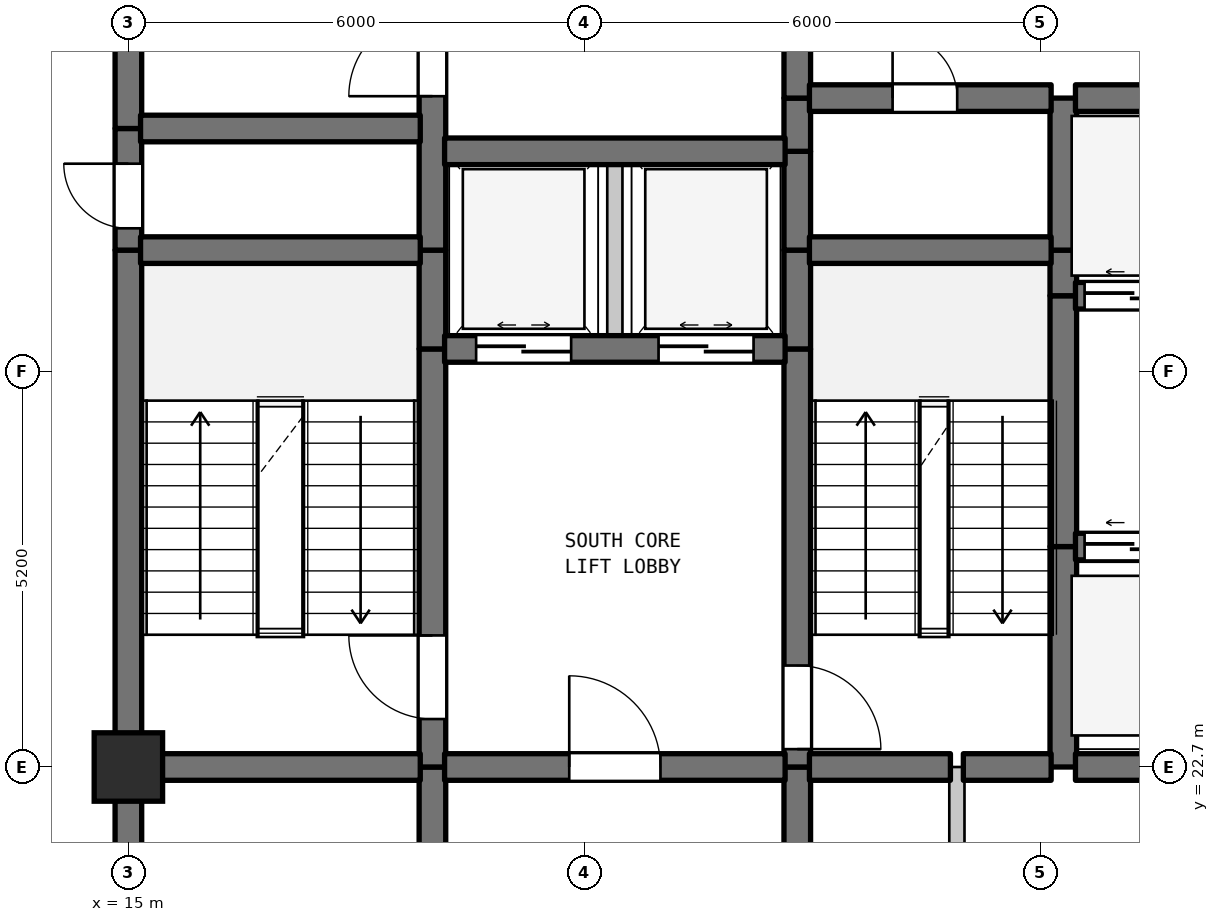
"""IFC4 building model, lengths in metres.
Left out: names, types, materials, properties, quantities, classifications, styles, units other than length and angle.
Written with IfcOpenShell. Run it as: python <this file> out.ifc"""

import sys

from ifc_helpers import new_model, si_unit, direction, frame, frame_2d, origin, origin_2d, place, context, subcontext, project, spatial, rectangle, extrude, element, fill, save


model = new_model("IFC4")
c1 = context("Model", 3, precision=1e-05, world=origin(), true_north=direction((0.0, 1.0)))
c2 = subcontext(c1, "Body", "Model", "MODEL_VIEW")
j1 = project(units=[si_unit("LENGTHUNIT", "METRE"), si_unit("PLANEANGLEUNIT", "RADIAN")], contexts=[c1])
p1 = place(None, origin())
s1 = spatial("IfcSite", under=j1, at=p1, CompositionType="ELEMENT")
p2 = place(p1, origin())
s2 = spatial("IfcBuilding", under=s1, at=p2, CompositionType="ELEMENT")
p3 = place(p2, frame((0.0, 0.0, 164.6)))
s3 = spatial("IfcBuildingStorey", under=s2, at=p3, CompositionType="ELEMENT", Elevation=164.6)
p4 = place(p3, frame((15.0, 22.7, 0.0), z_axis=(0.0, 0.0, 1.0), x_axis=(1.0, 0.0, 0.0)))
e1 = element("IfcColumn", 1, at=p4, inside=s3, PredefinedType="COLUMN", context=c2, shape_type="SweptSolid", body=[
    extrude(rectangle(XDim=0.9, YDim=0.9, at=origin_2d()), origin(), (0.0, 0.0, 1.0), 4.5),
])
p5 = place(p3, frame((15.0, 19.5, 0.0), z_axis=(0.0, 0.0, 1.0), x_axis=(0.0, 1.0, 0.0)))
e2 = element("IfcWall", 2, at=p5, inside=s3, PredefinedType="SHEAR", context=c2, shape_type="SweptSolid", body=[
    extrude(rectangle(XDim=3.2, YDim=0.35, at=frame_2d((1.6, 0.0))), origin(), (0.0, 0.0, 1.0), 4.19),
])
p6 = place(p3, frame((15.0, 22.7, 0.0), z_axis=(0.0, 0.0, 1.0), x_axis=(0.0, 1.0, 0.0)))
e3 = element("IfcWall", 3, at=p6, inside=s3, PredefinedType="SHEAR", context=c2, shape_type="SweptSolid", body=[
    extrude(rectangle(XDim=6.8, YDim=0.35, at=frame_2d((3.4, 0.0))), origin(), (0.0, 0.0, 1.0), 4.19),
])
p7 = place(p3, frame((15.0, 29.5, 0.0), z_axis=(0.0, 0.0, 1.0), x_axis=(0.0, 1.0, 0.0)))
e4 = element("IfcWall", 4, at=p7, inside=s3, PredefinedType="SHEAR", context=c2, shape_type="SweptSolid", body=[
    extrude(rectangle(XDim=1.6, YDim=0.35, at=frame_2d((0.8, 0.0))), origin(), (0.0, 0.0, 1.0), 4.19),
])
p8 = place(p7, frame((0.287, 0.0, 0.0)))
e5 = element("IfcOpeningElement", 5, at=p8, cuts=e4, PredefinedType="OPENING", context=c2, shape_type="SweptSolid", body=[
    extrude(rectangle(XDim=0.85, YDim=2.1, at=frame_2d((0.425, 1.05))), frame((0.0, 0.185, 0.0), z_axis=(0.0, -1.0, 0.0), x_axis=(1.0, 0.0, 0.0)), (0.0, 0.0, 1.0), 0.37),
])
p9 = place(p3, frame((15.0, 31.1, 0.0), z_axis=(0.0, 0.0, 1.0), x_axis=(0.0, 1.0, 0.0)))
e6 = element("IfcWall", 6, at=p9, inside=s3, PredefinedType="SHEAR", context=c2, shape_type="SweptSolid", body=[
    extrude(rectangle(XDim=6.8, YDim=0.35, at=frame_2d((3.4, 0.0))), origin(), (0.0, 0.0, 1.0), 4.19),
])
p10 = place(p3, frame((19.0, 19.5, 0.0), z_axis=(0.0, 0.0, 1.0), x_axis=(0.0, 1.0, 0.0)))
e7 = element("IfcWall", 7, at=p10, inside=s3, PredefinedType="SHEAR", context=c2, shape_type="SweptSolid", body=[
    extrude(rectangle(XDim=3.2, YDim=0.35, at=frame_2d((1.6, 0.0))), origin(), (0.0, 0.0, 1.0), 4.19),
])
p11 = place(p3, frame((19.0, 22.7, 0.0), z_axis=(0.0, 0.0, 1.0), x_axis=(0.0, 1.0, 0.0)))
e8 = element("IfcWall", 8, at=p11, inside=s3, PredefinedType="SHEAR", context=c2, shape_type="SweptSolid", body=[
    extrude(rectangle(XDim=5.5, YDim=0.35, at=frame_2d((2.75, 0.0))), origin(), (0.0, 0.0, 1.0), 4.19),
])
p12 = place(p11, frame((0.631, 0.0, 0.0)))
e9 = element("IfcOpeningElement", 9, at=p12, cuts=e8, PredefinedType="OPENING", context=c2, shape_type="SweptSolid", body=[
    extrude(rectangle(XDim=1.1, YDim=2.15, at=frame_2d((0.55, 1.075))), frame((0.0, 0.185, 0.0), z_axis=(0.0, -1.0, 0.0), x_axis=(1.0, 0.0, 0.0)), (0.0, 0.0, 1.0), 0.37),
])
p13 = place(p3, frame((19.0, 28.2, 0.0), z_axis=(0.0, 0.0, 1.0), x_axis=(0.0, 1.0, 0.0)))
e10 = element("IfcWall", 10, at=p13, inside=s3, PredefinedType="SHEAR", context=c2, shape_type="SweptSolid", body=[
    extrude(rectangle(XDim=1.3, YDim=0.35, at=frame_2d((0.65, 0.0))), origin(), (0.0, 0.0, 1.0), 4.19),
])
p14 = place(p3, frame((19.0, 29.5, 0.0), z_axis=(0.0, 0.0, 1.0), x_axis=(0.0, 1.0, 0.0)))
e11 = element("IfcWall", 11, at=p14, inside=s3, PredefinedType="SHEAR", context=c2, shape_type="SweptSolid", body=[
    extrude(rectangle(XDim=5.5, YDim=0.35, at=frame_2d((2.75, 0.0))), origin(), (0.0, 0.0, 1.0), 4.19),
])
p15 = place(p14, frame((2.025, 0.0, 0.0)))
e12 = element("IfcOpeningElement", 12, at=p15, cuts=e11, PredefinedType="OPENING", context=c2, shape_type="SweptSolid", body=[
    extrude(rectangle(XDim=1.1, YDim=2.15, at=frame_2d((0.55, 1.075))), frame((0.0, 0.185, 0.0), z_axis=(0.0, -1.0, 0.0), x_axis=(1.0, 0.0, 0.0)), (0.0, 0.0, 1.0), 0.37),
])
p16 = place(p3, frame((21.4, 28.2, 0.0), z_axis=(0.0, 0.0, 1.0), x_axis=(0.0, 1.0, 0.0)))
e13 = element("IfcWall", 13, at=p16, inside=s3, PredefinedType="STANDARD", context=c2, shape_type="SweptSolid", body=[
    extrude(rectangle(XDim=2.6, YDim=0.2, at=frame_2d((1.3, 0.0))), origin(), (0.0, 0.0, 1.0), 4.19),
])
p17 = place(p3, frame((23.8, 19.5, 0.0), z_axis=(0.0, 0.0, 1.0), x_axis=(0.0, 1.0, 0.0)))
e14 = element("IfcWall", 14, at=p17, inside=s3, PredefinedType="SHEAR", context=c2, shape_type="SweptSolid", body=[
    extrude(rectangle(XDim=3.2, YDim=0.35, at=frame_2d((1.6, 0.0))), origin(), (0.0, 0.0, 1.0), 4.19),
])
p18 = place(p3, frame((23.8, 22.7, 0.0), z_axis=(0.0, 0.0, 1.0), x_axis=(0.0, 1.0, 0.0)))
e15 = element("IfcWall", 15, at=p18, inside=s3, PredefinedType="SHEAR", context=c2, shape_type="SweptSolid", body=[
    extrude(rectangle(XDim=5.5, YDim=0.35, at=frame_2d((2.75, 0.0))), origin(), (0.0, 0.0, 1.0), 4.19),
])
p19 = place(p18, frame((0.235, 0.0, 0.0)))
e16 = element("IfcOpeningElement", 16, at=p19, cuts=e15, PredefinedType="OPENING", context=c2, shape_type="SweptSolid", body=[
    extrude(rectangle(XDim=1.1, YDim=2.15, at=frame_2d((0.55, 1.075))), frame((0.0, 0.185, 0.0), z_axis=(0.0, -1.0, 0.0), x_axis=(1.0, 0.0, 0.0)), (0.0, 0.0, 1.0), 0.37),
])
for number, where, z_axis, x_axis in (
    (17, (23.8, 28.2, 0.0), (0.0, 0.0, 1.0), (0.0, 1.0, 0.0)),
    (18, (23.8, 29.5, 0.0), (0.0, 0.0, 1.0), (0.0, 1.0, 0.0)),
):
    element("IfcWall", number, at=place(p3, frame(where, z_axis=z_axis, x_axis=x_axis)), inside=s3, PredefinedType="SHEAR", context=c2, shape_type="SweptSolid", body=[
        extrude(rectangle(XDim=1.3, YDim=0.35, at=frame_2d((0.65, 0.0))), origin(), (0.0, 0.0, 1.0), 4.19),
    ])
p20 = place(p3, frame((23.8, 30.8, 0.0), z_axis=(0.0, 0.0, 1.0), x_axis=(0.0, 1.0, 0.0)))
e19 = element("IfcWall", 19, at=p20, inside=s3, PredefinedType="SHEAR", context=c2, shape_type="SweptSolid", body=[
    extrude(rectangle(XDim=0.7, YDim=0.35, at=frame_2d((0.35, 0.0))), origin(), (0.0, 0.0, 1.0), 4.19),
])
p21 = place(p3, frame((23.8, 31.5, 0.0), z_axis=(0.0, 0.0, 1.0), x_axis=(0.0, 1.0, 0.0)))
e20 = element("IfcWall", 20, at=p21, inside=s3, PredefinedType="SHEAR", context=c2, shape_type="SweptSolid", body=[
    extrude(rectangle(XDim=3.5, YDim=0.35, at=frame_2d((1.75, 0.0))), origin(), (0.0, 0.0, 1.0), 4.19),
])
p22 = place(p21, frame((1.127, 0.0, 0.0)))
e21 = element("IfcOpeningElement", 21, at=p22, cuts=e20, PredefinedType="OPENING", context=c2, shape_type="SweptSolid", body=[
    extrude(rectangle(XDim=1.1, YDim=2.15, at=frame_2d((0.55, 1.075))), frame((0.0, 0.185, 0.0), z_axis=(0.0, -1.0, 0.0), x_axis=(1.0, 0.0, 0.0)), (0.0, 0.0, 1.0), 0.37),
])
p23 = place(p3, frame((25.9, 19.5, 0.0), z_axis=(0.0, 0.0, 1.0), x_axis=(0.0, 1.0, 0.0)))
e22 = element("IfcWall", 22, at=p23, inside=s3, PredefinedType="STANDARD", context=c2, shape_type="SweptSolid", body=[
    extrude(rectangle(XDim=3.2, YDim=0.2, at=frame_2d((1.6, 0.0))), origin(), (0.0, 0.0, 1.0), 4.19),
])
p24 = place(p3, frame((27.3, 22.7, 0.0), z_axis=(0.0, 0.0, 1.0), x_axis=(0.0, 1.0, 0.0)))
e23 = element("IfcWall", 23, at=p24, inside=s3, PredefinedType="SHEAR", context=c2, shape_type="SweptSolid", body=[
    extrude(rectangle(XDim=2.9, YDim=0.35, at=frame_2d((1.45, 0.0))), origin(), (0.0, 0.0, 1.0), 4.19),
])
p25 = place(p3, frame((27.3, 25.6, 0.0), z_axis=(0.0, 0.0, 1.0), x_axis=(0.0, 1.0, 0.0)))
e24 = element("IfcWall", 24, at=p25, inside=s3, PredefinedType="SHEAR", context=c2, shape_type="SweptSolid", body=[
    extrude(rectangle(XDim=3.3, YDim=0.35, at=frame_2d((1.65, 0.0))), origin(), (0.0, 0.0, 1.0), 4.19),
])
p26 = place(p3, frame((27.3, 28.9, 0.0), z_axis=(0.0, 0.0, 1.0), x_axis=(0.0, 1.0, 0.0)))
e25 = element("IfcWall", 25, at=p26, inside=s3, PredefinedType="SHEAR", context=c2, shape_type="SweptSolid", body=[
    extrude(rectangle(XDim=0.6, YDim=0.35, at=frame_2d((0.3, 0.0))), origin(), (0.0, 0.0, 1.0), 4.19),
])
p27 = place(p3, frame((27.3, 29.5, 0.0), z_axis=(0.0, 0.0, 1.0), x_axis=(0.0, 1.0, 0.0)))
e26 = element("IfcWall", 26, at=p27, inside=s3, PredefinedType="SHEAR", context=c2, shape_type="SweptSolid", body=[
    extrude(rectangle(XDim=2.0, YDim=0.35, at=frame_2d((1.0, 0.0))), origin(), (0.0, 0.0, 1.0), 4.19),
])
p28 = place(p3, frame((15.16, 22.7, 0.0), z_axis=(0.0, 0.0, 1.0), x_axis=(1.0, 0.0, 0.0)))
e27 = element("IfcWall", 27, at=p28, inside=s3, PredefinedType="SHEAR", context=c2, shape_type="SweptSolid", body=[
    extrude(rectangle(XDim=3.68, YDim=0.35, at=frame_2d((1.84, 0.0))), origin(), (0.0, 0.0, 1.0), 4.19),
])
p29 = place(p3, frame((19.16, 22.7, 0.0), z_axis=(0.0, 0.0, 1.0), x_axis=(1.0, 0.0, 0.0)))
e28 = element("IfcWall", 28, at=p29, inside=s3, PredefinedType="SHEAR", context=c2, shape_type="SweptSolid", body=[
    extrude(rectangle(XDim=4.48, YDim=0.35, at=frame_2d((2.24, 0.0))), origin(), (0.0, 0.0, 1.0), 4.19),
])
p30 = place(p29, frame((1.64, 0.0, 0.0)))
e29 = element("IfcOpeningElement", 29, at=p30, cuts=e28, PredefinedType="OPENING", context=c2, shape_type="SweptSolid", body=[
    extrude(rectangle(XDim=1.2, YDim=2.2, at=frame_2d((0.6, 1.1))), frame((0.0, 0.185, 0.0), z_axis=(0.0, -1.0, 0.0), x_axis=(1.0, 0.0, 0.0)), (0.0, 0.0, 1.0), 0.37),
])
p31 = place(p3, frame((23.96, 22.7, 0.0), z_axis=(0.0, 0.0, 1.0), x_axis=(1.0, 0.0, 0.0)))
e30 = element("IfcWall", 30, at=p31, inside=s3, PredefinedType="SHEAR", context=c2, shape_type="SweptSolid", body=[
    extrude(rectangle(XDim=1.855, YDim=0.35, at=frame_2d((0.927, 0.0))), origin(), (0.0, 0.0, 1.0), 4.19),
])
p32 = place(p3, frame((25.985, 22.7, 0.0), z_axis=(0.0, 0.0, 1.0), x_axis=(1.0, 0.0, 0.0)))
e31 = element("IfcWall", 31, at=p32, inside=s3, PredefinedType="SHEAR", context=c2, shape_type="SweptSolid", body=[
    extrude(rectangle(XDim=1.155, YDim=0.35, at=frame_2d((0.577, 0.0))), origin(), (0.0, 0.0, 1.0), 4.19),
])
p33 = place(p3, frame((27.46, 22.7, 0.0), z_axis=(0.0, 0.0, 1.0), x_axis=(1.0, 0.0, 0.0)))
e32 = element("IfcWall", 32, at=p33, inside=s3, PredefinedType="SHEAR", context=c2, shape_type="SweptSolid", body=[
    extrude(rectangle(XDim=3.18, YDim=0.35, at=frame_2d((1.59, 0.0))), origin(), (0.0, 0.0, 1.0), 4.19),
])
p34 = place(p3, frame((27.46, 25.6, 0.0), z_axis=(0.0, 0.0, 1.0), x_axis=(1.0, 0.0, 0.0)))
e33 = element("IfcWall", 33, at=p34, inside=s3, PredefinedType="SHEAR", context=c2, shape_type="SweptSolid", body=[
    extrude(rectangle(XDim=3.18, YDim=0.35, at=frame_2d((1.59, 0.0))), origin(), (0.0, 0.0, 1.0), 4.19),
])
p35 = place(p34, frame((0.12, 0.0, 0.0)))
e34 = element("IfcOpeningElement", 34, at=p35, cuts=e33, PredefinedType="OPENING", context=c2, shape_type="SweptSolid", body=[
    extrude(rectangle(XDim=1.25, YDim=2.2, at=frame_2d((0.625, 1.1))), frame((0.0, 0.185, 0.0), z_axis=(0.0, -1.0, 0.0), x_axis=(1.0, 0.0, 0.0)), (0.0, 0.0, 1.0), 0.37),
])
p36 = place(p34, frame((1.81, 0.0, 0.0)))
e35 = element("IfcOpeningElement", 35, at=p36, cuts=e33, PredefinedType="OPENING", context=c2, shape_type="SweptSolid", body=[
    extrude(rectangle(XDim=1.25, YDim=2.2, at=frame_2d((0.625, 1.1))), frame((0.0, 0.185, 0.0), z_axis=(0.0, -1.0, 0.0), x_axis=(1.0, 0.0, 0.0)), (0.0, 0.0, 1.0), 0.37),
])
p37 = place(p3, frame((19.16, 28.2, 0.0), z_axis=(0.0, 0.0, 1.0), x_axis=(1.0, 0.0, 0.0)))
e36 = element("IfcWall", 36, at=p37, inside=s3, PredefinedType="SHEAR", context=c2, shape_type="SweptSolid", body=[
    extrude(rectangle(XDim=4.48, YDim=0.35, at=frame_2d((2.24, 0.0))), origin(), (0.0, 0.0, 1.0), 4.19),
])
p38 = place(p37, frame((0.415, 0.0, 0.0)))
e37 = element("IfcOpeningElement", 37, at=p38, cuts=e36, PredefinedType="OPENING", context=c2, shape_type="SweptSolid", body=[
    extrude(rectangle(XDim=1.25, YDim=2.2, at=frame_2d((0.625, 1.1))), frame((0.0, 0.185, 0.0), z_axis=(0.0, -1.0, 0.0), x_axis=(1.0, 0.0, 0.0)), (0.0, 0.0, 1.0), 0.37),
])
p39 = place(p37, frame((2.815, 0.0, 0.0)))
e38 = element("IfcOpeningElement", 38, at=p39, cuts=e36, PredefinedType="OPENING", context=c2, shape_type="SweptSolid", body=[
    extrude(rectangle(XDim=1.25, YDim=2.2, at=frame_2d((0.625, 1.1))), frame((0.0, 0.185, 0.0), z_axis=(0.0, -1.0, 0.0), x_axis=(1.0, 0.0, 0.0)), (0.0, 0.0, 1.0), 0.37),
])
p40 = place(p3, frame((27.46, 28.9, 0.0), z_axis=(0.0, 0.0, 1.0), x_axis=(1.0, 0.0, 0.0)))
e39 = element("IfcWall", 39, at=p40, inside=s3, PredefinedType="SHEAR", context=c2, shape_type="SweptSolid", body=[
    extrude(rectangle(XDim=3.18, YDim=0.35, at=frame_2d((1.59, 0.0))), origin(), (0.0, 0.0, 1.0), 4.19),
])
p41 = place(p40, frame((0.12, 0.0, 0.0)))
e40 = element("IfcOpeningElement", 40, at=p41, cuts=e39, PredefinedType="OPENING", context=c2, shape_type="SweptSolid", body=[
    extrude(rectangle(XDim=1.25, YDim=2.2, at=frame_2d((0.625, 1.1))), frame((0.0, 0.185, 0.0), z_axis=(0.0, -1.0, 0.0), x_axis=(1.0, 0.0, 0.0)), (0.0, 0.0, 1.0), 0.37),
])
p42 = place(p40, frame((1.81, 0.0, 0.0)))
e41 = element("IfcOpeningElement", 41, at=p42, cuts=e39, PredefinedType="OPENING", context=c2, shape_type="SweptSolid", body=[
    extrude(rectangle(XDim=1.25, YDim=2.2, at=frame_2d((0.625, 1.1))), frame((0.0, 0.185, 0.0), z_axis=(0.0, -1.0, 0.0), x_axis=(1.0, 0.0, 0.0)), (0.0, 0.0, 1.0), 0.37),
])
p43 = place(p3, frame((15.16, 29.5, 0.0), z_axis=(0.0, 0.0, 1.0), x_axis=(1.0, 0.0, 0.0)))
e42 = element("IfcWall", 42, at=p43, inside=s3, PredefinedType="SHEAR", context=c2, shape_type="SweptSolid", body=[
    extrude(rectangle(XDim=3.68, YDim=0.35, at=frame_2d((1.84, 0.0))), origin(), (0.0, 0.0, 1.0), 4.19),
])
p44 = place(p3, frame((23.96, 29.5, 0.0), z_axis=(0.0, 0.0, 1.0), x_axis=(1.0, 0.0, 0.0)))
e43 = element("IfcWall", 43, at=p44, inside=s3, PredefinedType="SHEAR", context=c2, shape_type="SweptSolid", body=[
    extrude(rectangle(XDim=3.18, YDim=0.35, at=frame_2d((1.59, 0.0))), origin(), (0.0, 0.0, 1.0), 4.19),
])
p45 = place(p3, frame((19.16, 30.8, 0.0), z_axis=(0.0, 0.0, 1.0), x_axis=(1.0, 0.0, 0.0)))
e44 = element("IfcWall", 44, at=p45, inside=s3, PredefinedType="SHEAR", context=c2, shape_type="SweptSolid", body=[
    extrude(rectangle(XDim=4.48, YDim=0.35, at=frame_2d((2.24, 0.0))), origin(), (0.0, 0.0, 1.0), 4.19),
])
p46 = place(p3, frame((15.16, 31.1, 0.0), z_axis=(0.0, 0.0, 1.0), x_axis=(1.0, 0.0, 0.0)))
e45 = element("IfcWall", 45, at=p46, inside=s3, PredefinedType="SHEAR", context=c2, shape_type="SweptSolid", body=[
    extrude(rectangle(XDim=3.68, YDim=0.35, at=frame_2d((1.84, 0.0))), origin(), (0.0, 0.0, 1.0), 4.19),
])
p47 = place(p3, frame((23.96, 31.5, 0.0), z_axis=(0.0, 0.0, 1.0), x_axis=(1.0, 0.0, 0.0)))
e46 = element("IfcWall", 46, at=p47, inside=s3, PredefinedType="SHEAR", context=c2, shape_type="SweptSolid", body=[
    extrude(rectangle(XDim=3.18, YDim=0.35, at=frame_2d((1.59, 0.0))), origin(), (0.0, 0.0, 1.0), 4.19),
])
p48 = place(p47, frame((1.094, 0.0, 0.0)))
e47 = element("IfcOpeningElement", 47, at=p48, cuts=e46, PredefinedType="OPENING", context=c2, shape_type="SweptSolid", body=[
    extrude(rectangle(XDim=0.85, YDim=2.1, at=frame_2d((0.425, 1.05))), frame((0.0, 0.185, 0.0), z_axis=(0.0, -1.0, 0.0), x_axis=(1.0, 0.0, 0.0)), (0.0, 0.0, 1.0), 0.37),
])
p49 = place(p3, frame((27.46, 31.5, 0.0), z_axis=(0.0, 0.0, 1.0), x_axis=(1.0, 0.0, 0.0)))
e48 = element("IfcWall", 48, at=p49, inside=s3, PredefinedType="SHEAR", context=c2, shape_type="SweptSolid", body=[
    extrude(rectangle(XDim=3.18, YDim=0.35, at=frame_2d((1.59, 0.0))), origin(), (0.0, 0.0, 1.0), 4.19),
])
p50 = place(p8, origin())
e49 = element("IfcDoor", 49, at=p50, inside=s3, OperationType="SINGLE_SWING_RIGHT", PredefinedType="DOOR", context=c2, shape_type="SweptSolid", body=[
    extrude(rectangle(XDim=0.85, YDim=2.1, at=frame_2d((0.425, 1.05))), frame((0.0, 0.025, 0.0), z_axis=(0.0, -1.0, 0.0), x_axis=(1.0, 0.0, 0.0)), (0.0, 0.0, 1.0), 0.05),
])
fill(e5, e49)
p51 = place(p12, origin())
e50 = element("IfcDoor", 50, at=p51, inside=s3, OperationType="SINGLE_SWING_RIGHT", PredefinedType="DOOR", context=c2, shape_type="SweptSolid", body=[
    extrude(rectangle(XDim=1.1, YDim=2.15, at=frame_2d((0.55, 1.075))), frame((0.0, 0.025, 0.0), z_axis=(0.0, -1.0, 0.0), x_axis=(1.0, 0.0, 0.0)), (0.0, 0.0, 1.0), 0.05),
])
fill(e9, e50)
p52 = place(p15, origin())
e51 = element("IfcDoor", 51, at=p52, inside=s3, OperationType="SINGLE_SWING_LEFT", PredefinedType="DOOR", context=c2, shape_type="SweptSolid", body=[
    extrude(rectangle(XDim=1.1, YDim=2.15, at=frame_2d((0.55, 1.075))), frame((0.0, 0.025, 0.0), z_axis=(0.0, -1.0, 0.0), x_axis=(1.0, 0.0, 0.0)), (0.0, 0.0, 1.0), 0.05),
])
fill(e12, e51)
p53 = place(p19, frame((1.1, 0.0, 0.0), z_axis=(0.0, 0.0, 1.0), x_axis=(-1.0, 0.0, 0.0)))
e52 = element("IfcDoor", 52, at=p53, inside=s3, OperationType="SINGLE_SWING_LEFT", PredefinedType="DOOR", context=c2, shape_type="SweptSolid", body=[
    extrude(rectangle(XDim=1.1, YDim=2.15, at=frame_2d((0.55, 1.075))), frame((0.0, 0.025, 0.0), z_axis=(0.0, -1.0, 0.0), x_axis=(1.0, 0.0, 0.0)), (0.0, 0.0, 1.0), 0.05),
])
fill(e16, e52)
p54 = place(p30, origin())
e53 = element("IfcDoor", 53, at=p54, inside=s3, OperationType="SINGLE_SWING_LEFT", PredefinedType="DOOR", context=c2, shape_type="SweptSolid", body=[
    extrude(rectangle(XDim=1.2, YDim=2.2, at=frame_2d((0.6, 1.1))), frame((0.0, 0.025, 0.0), z_axis=(0.0, -1.0, 0.0), x_axis=(1.0, 0.0, 0.0)), (0.0, 0.0, 1.0), 0.05),
])
fill(e29, e53)
p55 = place(p35, origin())
e54 = element("IfcDoor", 54, at=p55, inside=s3, OperationType="DOUBLE_DOOR_SLIDING", PredefinedType="DOOR", context=c2, shape_type="SweptSolid", body=[
    extrude(rectangle(XDim=1.25, YDim=2.2, at=frame_2d((0.625, 1.1))), frame((0.0, 0.025, 0.0), z_axis=(0.0, -1.0, 0.0), x_axis=(1.0, 0.0, 0.0)), (0.0, 0.0, 1.0), 0.05),
])
fill(e34, e54)
p56 = place(p38, origin())
e55 = element("IfcDoor", 55, at=p56, inside=s3, OperationType="DOUBLE_DOOR_SLIDING", PredefinedType="DOOR", context=c2, shape_type="SweptSolid", body=[
    extrude(rectangle(XDim=1.25, YDim=2.2, at=frame_2d((0.625, 1.1))), frame((0.0, 0.025, 0.0), z_axis=(0.0, -1.0, 0.0), x_axis=(1.0, 0.0, 0.0)), (0.0, 0.0, 1.0), 0.05),
])
fill(e37, e55)
p57 = place(p39, origin())
e56 = element("IfcDoor", 56, at=p57, inside=s3, OperationType="DOUBLE_DOOR_SLIDING", PredefinedType="DOOR", context=c2, shape_type="SweptSolid", body=[
    extrude(rectangle(XDim=1.25, YDim=2.2, at=frame_2d((0.625, 1.1))), frame((0.0, 0.025, 0.0), z_axis=(0.0, -1.0, 0.0), x_axis=(1.0, 0.0, 0.0)), (0.0, 0.0, 1.0), 0.05),
])
fill(e38, e56)
p58 = place(p41, origin())
e57 = element("IfcDoor", 57, at=p58, inside=s3, OperationType="DOUBLE_DOOR_SLIDING", PredefinedType="DOOR", context=c2, shape_type="SweptSolid", body=[
    extrude(rectangle(XDim=1.25, YDim=2.2, at=frame_2d((0.625, 1.1))), frame((0.0, 0.025, 0.0), z_axis=(0.0, -1.0, 0.0), x_axis=(1.0, 0.0, 0.0)), (0.0, 0.0, 1.0), 0.05),
])
fill(e40, e57)
p59 = place(p48, origin())
e58 = element("IfcDoor", 58, at=p59, inside=s3, OperationType="SINGLE_SWING_LEFT", PredefinedType="DOOR", context=c2, shape_type="SweptSolid", body=[
    extrude(rectangle(XDim=0.85, YDim=2.1, at=frame_2d((0.425, 1.05))), frame((0.0, 0.025, 0.0), z_axis=(0.0, -1.0, 0.0), x_axis=(1.0, 0.0, 0.0)), (0.0, 0.0, 1.0), 0.05),
])
fill(e47, e58)
save(model, sys.argv[1])
